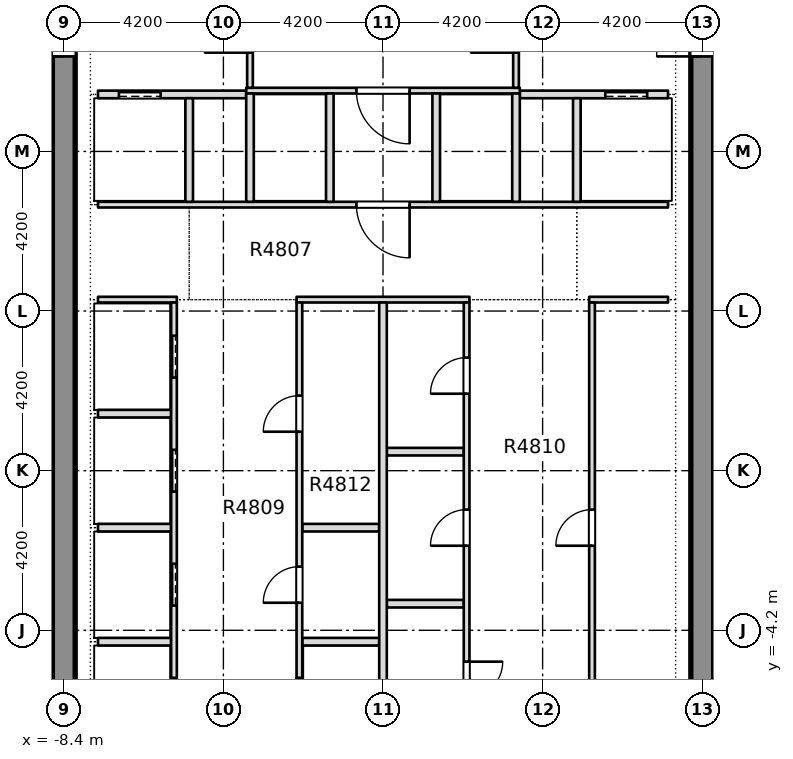
"""IFC4 building model, lengths in metres.
Left out: names, types, materials, properties, quantities, classifications, styles, units other than length and angle.
Written with IfcOpenShell. Run it as: python <this file> out.ifc"""

import sys

from ifc_helpers import new_model, si_unit, direction, frame, frame_2d, origin, place, context, subcontext, project, spatial, rectangle, extrude, element, fill, save


model = new_model("IFC4")
c1 = context("Model", 3, precision=1e-05, world=origin(), true_north=direction((0.0, 1.0)))
c2 = subcontext(c1, "Body", "Model", "MODEL_VIEW")
j1 = project(units=[si_unit("LENGTHUNIT", "METRE"), si_unit("PLANEANGLEUNIT", "RADIAN")], contexts=[c1])
p1 = place(None, origin())
s1 = spatial("IfcSite", under=j1, at=p1, CompositionType="ELEMENT")
p2 = place(p1, origin())
s2 = spatial("IfcBuilding", under=s1, at=p2, CompositionType="ELEMENT")
p3 = place(p2, frame((0.0, 0.0, 185.9)))
s3 = spatial("IfcBuildingStorey", under=s2, at=p3, CompositionType="ELEMENT", Elevation=185.9)
p4 = place(p3, frame((-8.4, -7.8, -0.4), z_axis=(0.0, 0.0, 1.0), x_axis=(0.0, 1.0, 0.0)))
e1 = element("IfcWall", 1, at=p4, inside=s3, PredefinedType="SHEAR", context=c2, shape_type="SweptSolid", body=[
    extrude(rectangle(XDim=28.95, YDim=0.6, at=frame_2d((14.475, 0.0))), origin(), (0.0, 0.0, 1.0), 3.45),
])
p5 = place(p4, frame((18.7, 0.0, 0.4)))
e2 = element("IfcOpeningElement", 2, at=p5, cuts=e1, PredefinedType="OPENING", context=c2, shape_type="SweptSolid", body=[
    extrude(rectangle(XDim=1.2, YDim=2.1, at=frame_2d((0.6, 1.05))), frame((0.0, 0.31, 0.0), z_axis=(0.0, -1.0, 0.0), x_axis=(1.0, 0.0, 0.0)), (0.0, 0.0, 1.0), 0.62),
])
p6 = place(p3, frame((8.4, -7.8, -0.4), z_axis=(0.0, 0.0, 1.0), x_axis=(0.0, 1.0, 0.0)))
e3 = element("IfcWall", 3, at=p6, inside=s3, PredefinedType="SHEAR", context=c2, shape_type="SweptSolid", body=[
    extrude(rectangle(XDim=28.95, YDim=0.6, at=frame_2d((14.475, 0.0))), origin(), (0.0, 0.0, 1.0), 3.45),
])
p7 = place(p6, frame((18.7, 0.0, 0.4)))
e4 = element("IfcOpeningElement", 4, at=p7, cuts=e3, PredefinedType="OPENING", context=c2, shape_type="SweptSolid", body=[
    extrude(rectangle(XDim=1.2, YDim=2.1, at=frame_2d((0.6, 1.05))), frame((0.0, 0.31, 0.0), z_axis=(0.0, -1.0, 0.0), x_axis=(1.0, 0.0, 0.0)), (0.0, 0.0, 1.0), 0.62),
])
p8 = place(p3, frame((-7.5, -4.5, 0.0), z_axis=(0.0, 0.0, 1.0), x_axis=(1.0, 0.0, 0.0)))
e5 = element("IfcWall", 5, at=p8, inside=s3, PredefinedType="PARTITIONING", context=c2, shape_type="SweptSolid", body=[
    extrude(rectangle(XDim=1.925, YDim=0.2, at=frame_2d((0.962, 0.0))), origin(), (0.0, 0.0, 1.0), 3.05),
])
for number, where, z_axis, x_axis in (
    (6, (-2.125, -4.5, 0.0), (0.0, 0.0, 1.0), (1.0, 0.0, 0.0)),
    (7, (0.1, -3.5, 0.0), (0.0, 0.0, 1.0), (1.0, 0.0, 0.0)),
):
    element("IfcWall", number, at=place(p3, frame(where, z_axis=z_axis, x_axis=x_axis)), inside=s3, PredefinedType="PARTITIONING", context=c2, shape_type="SweptSolid", body=[
        extrude(rectangle(XDim=2.025, YDim=0.2, at=frame_2d((1.012, 0.0))), origin(), (0.0, 0.0, 1.0), 3.05),
    ])
p9 = place(p3, frame((-7.5, -1.5, 0.0), z_axis=(0.0, 0.0, 1.0), x_axis=(1.0, 0.0, 0.0)))
e8 = element("IfcWall", 8, at=p9, inside=s3, PredefinedType="PARTITIONING", context=c2, shape_type="SweptSolid", body=[
    extrude(rectangle(XDim=1.925, YDim=0.2, at=frame_2d((0.962, 0.0))), origin(), (0.0, 0.0, 1.0), 3.05),
])
for number, where, z_axis, x_axis in (
    (9, (-2.125, -1.5, 0.0), (0.0, 0.0, 1.0), (1.0, 0.0, 0.0)),
    (10, (0.1, 0.5, 0.0), (0.0, 0.0, 1.0), (1.0, 0.0, 0.0)),
):
    element("IfcWall", number, at=place(p3, frame(where, z_axis=z_axis, x_axis=x_axis)), inside=s3, PredefinedType="PARTITIONING", context=c2, shape_type="SweptSolid", body=[
        extrude(rectangle(XDim=2.025, YDim=0.2, at=frame_2d((1.012, 0.0))), origin(), (0.0, 0.0, 1.0), 3.05),
    ])
p10 = place(p3, frame((-7.5, 1.5, 0.0), z_axis=(0.0, 0.0, 1.0), x_axis=(1.0, 0.0, 0.0)))
e11 = element("IfcWall", 11, at=p10, inside=s3, PredefinedType="PARTITIONING", context=c2, shape_type="SweptSolid", body=[
    extrude(rectangle(XDim=1.925, YDim=0.2, at=frame_2d((0.962, 0.0))), origin(), (0.0, 0.0, 1.0), 3.05),
])
p11 = place(p3, frame((-7.5, 4.5, 0.0), z_axis=(0.0, 0.0, 1.0), x_axis=(1.0, 0.0, 0.0)))
e12 = element("IfcWall", 12, at=p11, inside=s3, PredefinedType="PARTITIONING", context=c2, shape_type="SweptSolid", body=[
    extrude(rectangle(XDim=2.075, YDim=0.15, at=frame_2d((1.038, 0.0))), origin(), (0.0, 0.0, 1.0), 3.05),
])
p12 = place(p3, frame((-2.275, 4.5, 0.0), z_axis=(0.0, 0.0, 1.0), x_axis=(1.0, 0.0, 0.0)))
e13 = element("IfcWall", 13, at=p12, inside=s3, PredefinedType="PARTITIONING", context=c2, shape_type="SweptSolid", body=[
    extrude(rectangle(XDim=4.55, YDim=0.15, at=frame_2d((2.275, 0.0))), origin(), (0.0, 0.0, 1.0), 3.05),
])
p13 = place(p3, frame((5.425, 4.5, 0.0), z_axis=(0.0, 0.0, 1.0), x_axis=(1.0, 0.0, 0.0)))
e14 = element("IfcWall", 14, at=p13, inside=s3, PredefinedType="PARTITIONING", context=c2, shape_type="SweptSolid", body=[
    extrude(rectangle(XDim=2.075, YDim=0.15, at=frame_2d((1.038, 0.0))), origin(), (0.0, 0.0, 1.0), 3.05),
])
p14 = place(p3, frame((-7.5, 7.0, 0.0), z_axis=(0.0, 0.0, 1.0), x_axis=(1.0, 0.0, 0.0)))
e15 = element("IfcWall", 15, at=p14, inside=s3, PredefinedType="PARTITIONING", context=c2, shape_type="SweptSolid", body=[
    extrude(rectangle(XDim=15.0, YDim=0.15, at=frame_2d((7.5, 0.0))), origin(), (0.0, 0.0, 1.0), 3.05),
])
p15 = place(p14, frame((6.8, 0.0, 0.0)))
e16 = element("IfcOpeningElement", 16, at=p15, cuts=e15, PredefinedType="OPENING", context=c2, shape_type="SweptSolid", body=[
    extrude(rectangle(XDim=1.4, YDim=2.1, at=frame_2d((0.7, 1.05))), frame((0.0, 0.085, 0.0), z_axis=(0.0, -1.0, 0.0), x_axis=(1.0, 0.0, 0.0)), (0.0, 0.0, 1.0), 0.17),
])
p16 = place(p3, frame((-7.5, 9.9, 0.0), z_axis=(0.0, 0.0, 1.0), x_axis=(1.0, 0.0, 0.0)))
e17 = element("IfcWall", 17, at=p16, inside=s3, PredefinedType="PARTITIONING", context=c2, shape_type="SweptSolid", body=[
    extrude(rectangle(XDim=3.9, YDim=0.2, at=frame_2d((1.95, 0.0))), origin(), (0.0, 0.0, 1.0), 3.05),
])
p17 = place(p16, frame((0.55, 0.0, 0.0)))
e18 = element("IfcOpeningElement", 18, at=p17, cuts=e17, PredefinedType="OPENING", context=c2, shape_type="SweptSolid", body=[
    extrude(rectangle(XDim=1.1, YDim=2.1, at=frame_2d((0.55, 1.05))), frame((0.0, 0.11, 0.0), z_axis=(0.0, -1.0, 0.0), x_axis=(1.0, 0.0, 0.0)), (0.0, 0.0, 1.0), 0.22),
])
p18 = place(p3, frame((3.6, 9.9, 0.0), z_axis=(0.0, 0.0, 1.0), x_axis=(1.0, 0.0, 0.0)))
e19 = element("IfcWall", 19, at=p18, inside=s3, PredefinedType="PARTITIONING", context=c2, shape_type="SweptSolid", body=[
    extrude(rectangle(XDim=3.9, YDim=0.2, at=frame_2d((1.95, 0.0))), origin(), (0.0, 0.0, 1.0), 3.05),
])
p19 = place(p18, frame((2.25, 0.0, 0.0)))
e20 = element("IfcOpeningElement", 20, at=p19, cuts=e19, PredefinedType="OPENING", context=c2, shape_type="SweptSolid", body=[
    extrude(rectangle(XDim=1.1, YDim=2.1, at=frame_2d((0.55, 1.05))), frame((0.0, 0.11, 0.0), z_axis=(0.0, -1.0, 0.0), x_axis=(1.0, 0.0, 0.0)), (0.0, 0.0, 1.0), 0.22),
])
p20 = place(p3, frame((-3.6, 10.0, 0.0), z_axis=(0.0, 0.0, 1.0), x_axis=(1.0, 0.0, 0.0)))
e21 = element("IfcWall", 21, at=p20, inside=s3, PredefinedType="PARTITIONING", context=c2, shape_type="SweptSolid", body=[
    extrude(rectangle(XDim=7.2, YDim=0.15, at=frame_2d((3.6, 0.0))), origin(), (0.0, 0.0, 1.0), 3.05),
])
p21 = place(p20, frame((2.9, 0.0, 0.0)))
e22 = element("IfcOpeningElement", 22, at=p21, cuts=e21, PredefinedType="OPENING", context=c2, shape_type="SweptSolid", body=[
    extrude(rectangle(XDim=1.4, YDim=2.1, at=frame_2d((0.7, 1.05))), frame((0.0, 0.085, 0.0), z_axis=(0.0, -1.0, 0.0), x_axis=(1.0, 0.0, 0.0)), (0.0, 0.0, 1.0), 0.17),
])
p22 = place(p3, frame((-5.5, -7.799, 0.0), z_axis=(0.0, 0.0, 1.0), x_axis=(0.0, 1.0, 0.0)))
e23 = element("IfcWall", 23, at=p22, inside=s3, PredefinedType="PARTITIONING", context=c2, shape_type="SweptSolid", body=[
    extrude(rectangle(XDim=12.224, YDim=0.15, at=frame_2d((6.112, 0.0))), origin(), (0.0, 0.0, 1.0), 3.05),
])
p23 = place(p22, frame((1.249, 0.0, 0.0)))
e24 = element("IfcOpeningElement", 24, at=p23, cuts=e23, PredefinedType="OPENING", context=c2, shape_type="SweptSolid", body=[
    extrude(rectangle(XDim=1.1, YDim=2.1, at=frame_2d((0.55, 1.05))), frame((0.0, 0.085, 0.0), z_axis=(0.0, -1.0, 0.0), x_axis=(1.0, 0.0, 0.0)), (0.0, 0.0, 1.0), 0.17),
])
p24 = place(p22, frame((4.249, 0.0, 0.0)))
e25 = element("IfcOpeningElement", 25, at=p24, cuts=e23, PredefinedType="OPENING", context=c2, shape_type="SweptSolid", body=[
    extrude(rectangle(XDim=1.1, YDim=2.1, at=frame_2d((0.55, 1.05))), frame((0.0, 0.085, 0.0), z_axis=(0.0, -1.0, 0.0), x_axis=(1.0, 0.0, 0.0)), (0.0, 0.0, 1.0), 0.17),
])
p25 = place(p22, frame((7.249, 0.0, 0.0)))
e26 = element("IfcOpeningElement", 26, at=p25, cuts=e23, PredefinedType="OPENING", context=c2, shape_type="SweptSolid", body=[
    extrude(rectangle(XDim=1.1, YDim=2.1, at=frame_2d((0.55, 1.05))), frame((0.0, 0.085, 0.0), z_axis=(0.0, -1.0, 0.0), x_axis=(1.0, 0.0, 0.0)), (0.0, 0.0, 1.0), 0.17),
])
p26 = place(p22, frame((10.249, 0.0, 0.0)))
e27 = element("IfcOpeningElement", 27, at=p26, cuts=e23, PredefinedType="OPENING", context=c2, shape_type="SweptSolid", body=[
    extrude(rectangle(XDim=1.1, YDim=2.1, at=frame_2d((0.55, 1.05))), frame((0.0, 0.085, 0.0), z_axis=(0.0, -1.0, 0.0), x_axis=(1.0, 0.0, 0.0)), (0.0, 0.0, 1.0), 0.17),
])
p27 = place(p3, frame((-5.1, 7.075, 0.0), z_axis=(0.0, 0.0, 1.0), x_axis=(0.0, 1.0, 0.0)))
e28 = element("IfcWall", 28, at=p27, inside=s3, PredefinedType="PARTITIONING", context=c2, shape_type="SweptSolid", body=[
    extrude(rectangle(XDim=2.725, YDim=0.2, at=frame_2d((1.363, 0.0))), origin(), (0.0, 0.0, 1.0), 3.05),
])
p28 = place(p3, frame((-3.5, 7.075, 0.0), z_axis=(0.0, 0.0, 1.0), x_axis=(0.0, 1.0, 0.0)))
e29 = element("IfcWall", 29, at=p28, inside=s3, PredefinedType="PARTITIONING", context=c2, shape_type="SweptSolid", body=[
    extrude(rectangle(XDim=2.85, YDim=0.2, at=frame_2d((1.425, 0.0))), origin(), (0.0, 0.0, 1.0), 3.05),
])
p29 = place(p3, frame((-3.5, 10.075, 0.0), z_axis=(0.0, 0.0, 1.0), x_axis=(0.0, 1.0, 0.0)))
e30 = element("IfcWall", 30, at=p29, inside=s3, PredefinedType="PARTITIONING", context=c2, shape_type="SweptSolid", body=[
    extrude(rectangle(XDim=3.075, YDim=0.15, at=frame_2d((1.538, 0.0))), origin(), (0.0, 0.0, 1.0), 3.05),
])
p30 = place(p29, frame((0.925, 0.0, 0.0)))
e31 = element("IfcOpeningElement", 31, at=p30, cuts=e30, PredefinedType="OPENING", context=c2, shape_type="SweptSolid", body=[
    extrude(rectangle(XDim=1.2, YDim=2.1, at=frame_2d((0.6, 1.05))), frame((0.0, 0.085, 0.0), z_axis=(0.0, -1.0, 0.0), x_axis=(1.0, 0.0, 0.0)), (0.0, 0.0, 1.0), 0.17),
])
p31 = place(p3, frame((-2.2, -7.799, 0.0), z_axis=(0.0, 0.0, 1.0), x_axis=(0.0, 1.0, 0.0)))
e32 = element("IfcWall", 32, at=p31, inside=s3, PredefinedType="PARTITIONING", context=c2, shape_type="SweptSolid", body=[
    extrude(rectangle(XDim=12.224, YDim=0.15, at=frame_2d((6.112, 0.0))), origin(), (0.0, 0.0, 1.0), 3.05),
])
p32 = place(p31, frame((1.249, 0.0, 0.0)))
e33 = element("IfcOpeningElement", 33, at=p32, cuts=e32, PredefinedType="OPENING", context=c2, shape_type="SweptSolid", body=[
    extrude(rectangle(XDim=1.1, YDim=2.1, at=frame_2d((0.55, 1.05))), frame((0.0, 0.085, 0.0), z_axis=(0.0, -1.0, 0.0), x_axis=(1.0, 0.0, 0.0)), (0.0, 0.0, 1.0), 0.17),
])
p33 = place(p31, frame((4.324, 0.0, 0.0)))
e34 = element("IfcOpeningElement", 34, at=p33, cuts=e32, PredefinedType="OPENING", context=c2, shape_type="SweptSolid", body=[
    extrude(rectangle(XDim=0.95, YDim=2.1, at=frame_2d((0.475, 1.05))), frame((0.0, 0.085, 0.0), z_axis=(0.0, -1.0, 0.0), x_axis=(1.0, 0.0, 0.0)), (0.0, 0.0, 1.0), 0.17),
])
p34 = place(p31, frame((8.824, 0.0, 0.0)))
e35 = element("IfcOpeningElement", 35, at=p34, cuts=e32, PredefinedType="OPENING", context=c2, shape_type="SweptSolid", body=[
    extrude(rectangle(XDim=0.95, YDim=2.1, at=frame_2d((0.475, 1.05))), frame((0.0, 0.085, 0.0), z_axis=(0.0, -1.0, 0.0), x_axis=(1.0, 0.0, 0.0)), (0.0, 0.0, 1.0), 0.17),
])
p35 = place(p3, frame((-1.4, 7.075, 0.0), z_axis=(0.0, 0.0, 1.0), x_axis=(0.0, 1.0, 0.0)))
e36 = element("IfcWall", 36, at=p35, inside=s3, PredefinedType="PARTITIONING", context=c2, shape_type="SweptSolid", body=[
    extrude(rectangle(XDim=2.85, YDim=0.2, at=frame_2d((1.425, 0.0))), origin(), (0.0, 0.0, 1.0), 3.05),
])
p36 = place(p3, frame((0.0, -7.799, 0.0), z_axis=(0.0, 0.0, 1.0), x_axis=(0.0, 1.0, 0.0)))
e37 = element("IfcWall", 37, at=p36, inside=s3, PredefinedType="PARTITIONING", context=c2, shape_type="SweptSolid", body=[
    extrude(rectangle(XDim=12.224, YDim=0.2, at=frame_2d((6.112, 0.0))), origin(), (0.0, 0.0, 1.0), 3.05),
])
p37 = place(p3, frame((1.4, 7.075, 0.0), z_axis=(0.0, 0.0, 1.0), x_axis=(0.0, 1.0, 0.0)))
e38 = element("IfcWall", 38, at=p37, inside=s3, PredefinedType="PARTITIONING", context=c2, shape_type="SweptSolid", body=[
    extrude(rectangle(XDim=2.85, YDim=0.2, at=frame_2d((1.425, 0.0))), origin(), (0.0, 0.0, 1.0), 3.05),
])
p38 = place(p3, frame((2.2, -7.799, 0.0), z_axis=(0.0, 0.0, 1.0), x_axis=(0.0, 1.0, 0.0)))
e39 = element("IfcWall", 39, at=p38, inside=s3, PredefinedType="PARTITIONING", context=c2, shape_type="SweptSolid", body=[
    extrude(rectangle(XDim=12.224, YDim=0.15, at=frame_2d((6.112, 0.0))), origin(), (0.0, 0.0, 1.0), 3.05),
])
p39 = place(p38, frame((1.824, 0.0, 0.0)))
e40 = element("IfcOpeningElement", 40, at=p39, cuts=e39, PredefinedType="OPENING", context=c2, shape_type="SweptSolid", body=[
    extrude(rectangle(XDim=0.95, YDim=2.1, at=frame_2d((0.475, 1.05))), frame((0.0, 0.085, 0.0), z_axis=(0.0, -1.0, 0.0), x_axis=(1.0, 0.0, 0.0)), (0.0, 0.0, 1.0), 0.17),
])
p40 = place(p38, frame((5.824, 0.0, 0.0)))
e41 = element("IfcOpeningElement", 41, at=p40, cuts=e39, PredefinedType="OPENING", context=c2, shape_type="SweptSolid", body=[
    extrude(rectangle(XDim=0.95, YDim=2.1, at=frame_2d((0.475, 1.05))), frame((0.0, 0.085, 0.0), z_axis=(0.0, -1.0, 0.0), x_axis=(1.0, 0.0, 0.0)), (0.0, 0.0, 1.0), 0.17),
])
p41 = place(p38, frame((9.824, 0.0, 0.0)))
e42 = element("IfcOpeningElement", 42, at=p41, cuts=e39, PredefinedType="OPENING", context=c2, shape_type="SweptSolid", body=[
    extrude(rectangle(XDim=0.95, YDim=2.1, at=frame_2d((0.475, 1.05))), frame((0.0, 0.085, 0.0), z_axis=(0.0, -1.0, 0.0), x_axis=(1.0, 0.0, 0.0)), (0.0, 0.0, 1.0), 0.17),
])
p42 = place(p3, frame((3.5, 7.075, 0.0), z_axis=(0.0, 0.0, 1.0), x_axis=(0.0, 1.0, 0.0)))
e43 = element("IfcWall", 43, at=p42, inside=s3, PredefinedType="PARTITIONING", context=c2, shape_type="SweptSolid", body=[
    extrude(rectangle(XDim=2.85, YDim=0.2, at=frame_2d((1.425, 0.0))), origin(), (0.0, 0.0, 1.0), 3.05),
])
p43 = place(p3, frame((3.5, 10.075, 0.0), z_axis=(0.0, 0.0, 1.0), x_axis=(0.0, 1.0, 0.0)))
e44 = element("IfcWall", 44, at=p43, inside=s3, PredefinedType="PARTITIONING", context=c2, shape_type="SweptSolid", body=[
    extrude(rectangle(XDim=3.075, YDim=0.15, at=frame_2d((1.538, 0.0))), origin(), (0.0, 0.0, 1.0), 3.05),
])
p44 = place(p43, frame((0.925, 0.0, 0.0)))
e45 = element("IfcOpeningElement", 45, at=p44, cuts=e44, PredefinedType="OPENING", context=c2, shape_type="SweptSolid", body=[
    extrude(rectangle(XDim=1.2, YDim=2.1, at=frame_2d((0.6, 1.05))), frame((0.0, 0.085, 0.0), z_axis=(0.0, -1.0, 0.0), x_axis=(1.0, 0.0, 0.0)), (0.0, 0.0, 1.0), 0.17),
])
p45 = place(p3, frame((5.1, 7.075, 0.0), z_axis=(0.0, 0.0, 1.0), x_axis=(0.0, 1.0, 0.0)))
e46 = element("IfcWall", 46, at=p45, inside=s3, PredefinedType="PARTITIONING", context=c2, shape_type="SweptSolid", body=[
    extrude(rectangle(XDim=2.725, YDim=0.2, at=frame_2d((1.363, 0.0))), origin(), (0.0, 0.0, 1.0), 3.05),
])
p46 = place(p3, frame((5.5, -7.799, 0.0), z_axis=(0.0, 0.0, 1.0), x_axis=(0.0, 1.0, 0.0)))
e47 = element("IfcWall", 47, at=p46, inside=s3, PredefinedType="PARTITIONING", context=c2, shape_type="SweptSolid", body=[
    extrude(rectangle(XDim=12.224, YDim=0.15, at=frame_2d((6.112, 0.0))), origin(), (0.0, 0.0, 1.0), 3.05),
])
p47 = place(p46, frame((5.824, 0.0, 0.0)))
e48 = element("IfcOpeningElement", 48, at=p47, cuts=e47, PredefinedType="OPENING", context=c2, shape_type="SweptSolid", body=[
    extrude(rectangle(XDim=0.95, YDim=2.1, at=frame_2d((0.475, 1.05))), frame((0.0, 0.085, 0.0), z_axis=(0.0, -1.0, 0.0), x_axis=(1.0, 0.0, 0.0)), (0.0, 0.0, 1.0), 0.17),
])
p48 = place(p23, origin())
e49 = element("IfcDoor", 49, at=p48, inside=s3, OperationType="SLIDING_TO_LEFT", PredefinedType="DOOR", context=c2, shape_type="SweptSolid", body=[
    extrude(rectangle(XDim=1.1, YDim=2.1, at=frame_2d((0.55, 1.05))), frame((0.0, 0.025, 0.0), z_axis=(0.0, -1.0, 0.0), x_axis=(1.0, 0.0, 0.0)), (0.0, 0.0, 1.0), 0.05),
])
fill(e24, e49)
p49 = place(p24, origin())
e50 = element("IfcDoor", 50, at=p49, inside=s3, OperationType="SLIDING_TO_LEFT", PredefinedType="DOOR", context=c2, shape_type="SweptSolid", body=[
    extrude(rectangle(XDim=1.1, YDim=2.1, at=frame_2d((0.55, 1.05))), frame((0.0, 0.025, 0.0), z_axis=(0.0, -1.0, 0.0), x_axis=(1.0, 0.0, 0.0)), (0.0, 0.0, 1.0), 0.05),
])
fill(e25, e50)
p50 = place(p25, origin())
e51 = element("IfcDoor", 51, at=p50, inside=s3, OperationType="SLIDING_TO_LEFT", PredefinedType="DOOR", context=c2, shape_type="SweptSolid", body=[
    extrude(rectangle(XDim=1.1, YDim=2.1, at=frame_2d((0.55, 1.05))), frame((0.0, 0.025, 0.0), z_axis=(0.0, -1.0, 0.0), x_axis=(1.0, 0.0, 0.0)), (0.0, 0.0, 1.0), 0.05),
])
fill(e26, e51)
p51 = place(p26, origin())
e52 = element("IfcDoor", 52, at=p51, inside=s3, OperationType="SLIDING_TO_LEFT", PredefinedType="DOOR", context=c2, shape_type="SweptSolid", body=[
    extrude(rectangle(XDim=1.1, YDim=2.1, at=frame_2d((0.55, 1.05))), frame((0.0, 0.025, 0.0), z_axis=(0.0, -1.0, 0.0), x_axis=(1.0, 0.0, 0.0)), (0.0, 0.0, 1.0), 0.05),
])
fill(e27, e52)
p52 = place(p32, origin())
e53 = element("IfcDoor", 53, at=p52, inside=s3, OperationType="SLIDING_TO_LEFT", PredefinedType="DOOR", context=c2, shape_type="SweptSolid", body=[
    extrude(rectangle(XDim=1.1, YDim=2.1, at=frame_2d((0.55, 1.05))), frame((0.0, 0.025, 0.0), z_axis=(0.0, -1.0, 0.0), x_axis=(1.0, 0.0, 0.0)), (0.0, 0.0, 1.0), 0.05),
])
fill(e33, e53)
p53 = place(p33, origin())
e54 = element("IfcDoor", 54, at=p53, inside=s3, OperationType="SINGLE_SWING_RIGHT", PredefinedType="DOOR", context=c2, shape_type="SweptSolid", body=[
    extrude(rectangle(XDim=0.95, YDim=2.1, at=frame_2d((0.475, 1.05))), frame((0.0, 0.025, 0.0), z_axis=(0.0, -1.0, 0.0), x_axis=(1.0, 0.0, 0.0)), (0.0, 0.0, 1.0), 0.05),
])
fill(e34, e54)
p54 = place(p34, origin())
e55 = element("IfcDoor", 55, at=p54, inside=s3, OperationType="SINGLE_SWING_LEFT", PredefinedType="DOOR", context=c2, shape_type="SweptSolid", body=[
    extrude(rectangle(XDim=0.95, YDim=2.1, at=frame_2d((0.475, 1.05))), frame((0.0, 0.025, 0.0), z_axis=(0.0, -1.0, 0.0), x_axis=(1.0, 0.0, 0.0)), (0.0, 0.0, 1.0), 0.05),
])
fill(e35, e55)
p55 = place(p39, origin())
e56 = element("IfcDoor", 56, at=p55, inside=s3, OperationType="SINGLE_SWING_RIGHT", PredefinedType="DOOR", context=c2, shape_type="SweptSolid", body=[
    extrude(rectangle(XDim=0.95, YDim=2.1, at=frame_2d((0.475, 1.05))), frame((0.0, 0.025, 0.0), z_axis=(0.0, -1.0, 0.0), x_axis=(1.0, 0.0, 0.0)), (0.0, 0.0, 1.0), 0.05),
])
fill(e40, e56)
p56 = place(p40, origin())
e57 = element("IfcDoor", 57, at=p56, inside=s3, OperationType="SINGLE_SWING_RIGHT", PredefinedType="DOOR", context=c2, shape_type="SweptSolid", body=[
    extrude(rectangle(XDim=0.95, YDim=2.1, at=frame_2d((0.475, 1.05))), frame((0.0, 0.025, 0.0), z_axis=(0.0, -1.0, 0.0), x_axis=(1.0, 0.0, 0.0)), (0.0, 0.0, 1.0), 0.05),
])
fill(e41, e57)
p57 = place(p41, origin())
e58 = element("IfcDoor", 58, at=p57, inside=s3, OperationType="SINGLE_SWING_LEFT", PredefinedType="DOOR", context=c2, shape_type="SweptSolid", body=[
    extrude(rectangle(XDim=0.95, YDim=2.1, at=frame_2d((0.475, 1.05))), frame((0.0, 0.025, 0.0), z_axis=(0.0, -1.0, 0.0), x_axis=(1.0, 0.0, 0.0)), (0.0, 0.0, 1.0), 0.05),
])
fill(e42, e58)
p58 = place(p47, origin())
e59 = element("IfcDoor", 59, at=p58, inside=s3, OperationType="SINGLE_SWING_LEFT", PredefinedType="DOOR", context=c2, shape_type="SweptSolid", body=[
    extrude(rectangle(XDim=0.95, YDim=2.1, at=frame_2d((0.475, 1.05))), frame((0.0, 0.025, 0.0), z_axis=(0.0, -1.0, 0.0), x_axis=(1.0, 0.0, 0.0)), (0.0, 0.0, 1.0), 0.05),
])
fill(e48, e59)
p59 = place(p17, origin())
e60 = element("IfcDoor", 60, at=p59, inside=s3, OperationType="SLIDING_TO_RIGHT", PredefinedType="DOOR", context=c2, shape_type="SweptSolid", body=[
    extrude(rectangle(XDim=1.1, YDim=2.1, at=frame_2d((0.55, 1.05))), frame((0.0, 0.025, 0.0), z_axis=(0.0, -1.0, 0.0), x_axis=(1.0, 0.0, 0.0)), (0.0, 0.0, 1.0), 0.05),
])
fill(e18, e60)
p60 = place(p19, origin())
e61 = element("IfcDoor", 61, at=p60, inside=s3, OperationType="SLIDING_TO_LEFT", PredefinedType="DOOR", context=c2, shape_type="SweptSolid", body=[
    extrude(rectangle(XDim=1.1, YDim=2.1, at=frame_2d((0.55, 1.05))), frame((0.0, 0.025, 0.0), z_axis=(0.0, -1.0, 0.0), x_axis=(1.0, 0.0, 0.0)), (0.0, 0.0, 1.0), 0.05),
])
fill(e20, e61)
p61 = place(p15, origin())
e62 = element("IfcDoor", 62, at=p61, inside=s3, OperationType="SINGLE_SWING_RIGHT", PredefinedType="DOOR", context=c2, shape_type="SweptSolid", body=[
    extrude(rectangle(XDim=1.4, YDim=2.1, at=frame_2d((0.7, 1.05))), frame((0.0, 0.025, 0.0), z_axis=(0.0, -1.0, 0.0), x_axis=(1.0, 0.0, 0.0)), (0.0, 0.0, 1.0), 0.05),
])
fill(e16, e62)
p62 = place(p21, origin())
e63 = element("IfcDoor", 63, at=p62, inside=s3, OperationType="SINGLE_SWING_RIGHT", PredefinedType="DOOR", context=c2, shape_type="SweptSolid", body=[
    extrude(rectangle(XDim=1.4, YDim=2.1, at=frame_2d((0.7, 1.05))), frame((0.0, 0.025, 0.0), z_axis=(0.0, -1.0, 0.0), x_axis=(1.0, 0.0, 0.0)), (0.0, 0.0, 1.0), 0.05),
])
fill(e22, e63)
p63 = place(p5, origin())
e64 = element("IfcDoor", 64, at=p63, inside=s3, OperationType="SINGLE_SWING_LEFT", PredefinedType="DOOR", context=c2, shape_type="SweptSolid", body=[
    extrude(rectangle(XDim=1.2, YDim=2.1, at=frame_2d((0.6, 1.05))), frame((0.0, 0.025, 0.0), z_axis=(0.0, -1.0, 0.0), x_axis=(1.0, 0.0, 0.0)), (0.0, 0.0, 1.0), 0.05),
])
fill(e2, e64)
p64 = place(p7, origin())
e65 = element("IfcDoor", 65, at=p64, inside=s3, OperationType="SINGLE_SWING_LEFT", PredefinedType="DOOR", context=c2, shape_type="SweptSolid", body=[
    extrude(rectangle(XDim=1.2, YDim=2.1, at=frame_2d((0.6, 1.05))), frame((0.0, 0.025, 0.0), z_axis=(0.0, -1.0, 0.0), x_axis=(1.0, 0.0, 0.0)), (0.0, 0.0, 1.0), 0.05),
])
fill(e4, e65)
save(model, sys.argv[1])
